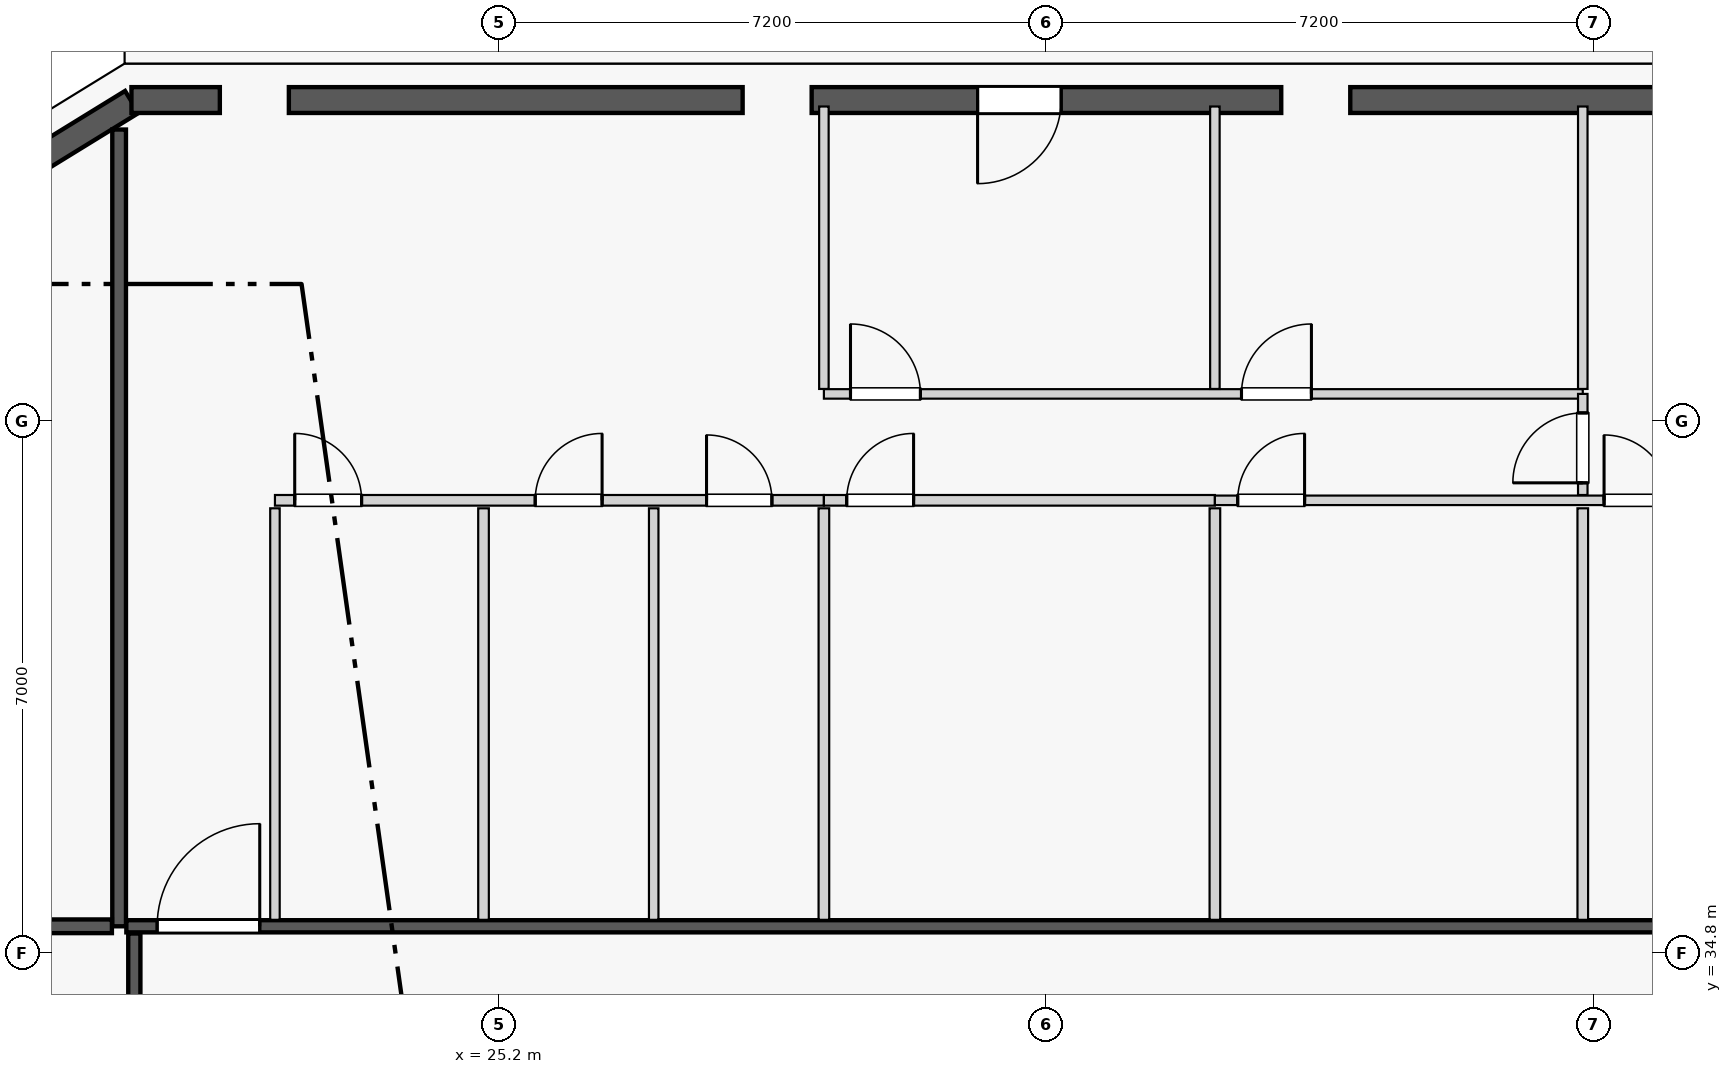
"""IFC4 building model, lengths in metres.
Left out: names, types, materials, properties, quantities, classifications, styles, units other than length and angle.
Written with IfcOpenShell. Run it as: python <this file> out.ifc"""

import sys

from ifc_helpers import new_model, si_unit, direction, frame, frame_2d, origin, origin_2d, place, context, subcontext, project, spatial, rectangle, extrude, element, fill, save


model = new_model("IFC4")
c1 = context("Model", 3, precision=1e-05, world=origin(), true_north=direction((0.0, 1.0)))
c2 = subcontext(c1, "Body", "Model", "MODEL_VIEW")
j1 = project(units=[si_unit("LENGTHUNIT", "METRE"), si_unit("PLANEANGLEUNIT", "RADIAN")], contexts=[c1])
p1 = place(None, origin())
s1 = spatial("IfcSite", under=j1, at=p1, CompositionType="ELEMENT")
p2 = place(p1, origin())
s2 = spatial("IfcBuilding", under=s1, at=p2, CompositionType="ELEMENT")
p3 = place(p2, frame((0.0, 0.0, 186.1)))
s3 = spatial("IfcBuildingStorey", under=s2, at=p3, CompositionType="ELEMENT", Elevation=186.1)
for number, where, z_axis, x_axis in (
    (1, (35.943, 45.958, 0.0), (0.0, 0.0, 1.0), (1.0, 0.0, 0.0)),
    (2, (28.857, 45.958, 0.0), (0.0, 0.0, 1.0), (1.0, 0.0, 0.0)),
    (3, (21.979, 46.011, 0.0), (0.0, 0.0, 1.0), (1.0, 0.0, 0.0)),
):
    element("IfcColumn", number, at=place(p3, frame(where, z_axis=z_axis, x_axis=x_axis)), inside=s3, PredefinedType="COLUMN", context=c2, shape_type="SweptSolid", body=[
        extrude(rectangle(XDim=0.9, YDim=0.9, at=origin_2d()), origin(), (0.0, 0.0, 1.0), 3.55),
    ])
p4 = place(p3, frame((20.142, 44.947, 0.0), z_axis=(0.0, 0.0, 1.0), x_axis=(-0.865230187018, -0.501374833306, 0.0)))
e4 = element("IfcColumn", 4, at=p4, inside=s3, PredefinedType="PILASTER", context=c2, shape_type="SweptSolid", body=[
    extrude(rectangle(XDim=0.5, YDim=0.35, at=origin_2d()), origin(), (0.0, 0.0, 1.0), 3.55),
])
p5 = place(p3, frame((20.367, 45.995, 0.0), z_axis=(0.0, 0.0, 1.0), x_axis=(-0.851713271379, -0.524008113828, 0.0)))
e5 = element("IfcWall", 5, at=p5, inside=s3, PredefinedType="STANDARD", context=c2, shape_type="SweptSolid", body=[
    extrude(rectangle(XDim=1.678, YDim=0.34, at=frame_2d((0.839, 0.0))), origin(), (0.0, 0.0, 1.0), 3.35),
])
p6 = place(p3, frame((42.367, 46.02, 0.0), z_axis=(0.0, 0.0, 1.0), x_axis=(-1.0, 0.0, 0.0)))
e6 = element("IfcWall", 6, at=p6, inside=s3, PredefinedType="STANDARD", context=c2, shape_type="SweptSolid", body=[
    extrude(rectangle(XDim=5.97, YDim=0.34, at=frame_2d((2.985, 0.0))), origin(), (0.0, 0.0, 1.0), 2.883),
])
p7 = place(p6, frame((0.849, 0.0, 0.75)))
e7 = element("IfcOpeningElement", 7, at=p7, cuts=e6, PredefinedType="OPENING", context=c2, shape_type="SweptSolid", body=[
    extrude(rectangle(XDim=1.1, YDim=1.983, at=frame_2d((0.55, 0.991))), frame((0.0, 0.18, 0.0), z_axis=(0.0, -1.0, 0.0), x_axis=(1.0, 0.0, 0.0)), (0.0, 0.0, 1.0), 0.36),
])
p8 = place(p6, frame((3.947, 0.0, 0.75)))
e8 = element("IfcOpeningElement", 8, at=p8, cuts=e6, PredefinedType="OPENING", context=c2, shape_type="SweptSolid", body=[
    extrude(rectangle(XDim=1.1, YDim=1.983, at=frame_2d((0.55, 0.991))), frame((0.0, 0.18, 0.0), z_axis=(0.0, -1.0, 0.0), x_axis=(1.0, 0.0, 0.0)), (0.0, 0.0, 1.0), 0.36),
])
p9 = place(p3, frame((35.489, 46.02, 0.0), z_axis=(0.0, 0.0, 1.0), x_axis=(-1.0, 0.0, 0.0)))
e9 = element("IfcWall", 9, at=p9, inside=s3, PredefinedType="STANDARD", context=c2, shape_type="SweptSolid", body=[
    extrude(rectangle(XDim=6.178, YDim=0.34, at=frame_2d((3.089, 0.0))), origin(), (0.0, 0.0, 1.0), 2.883),
])
p10 = place(p9, frame((2.895, 0.0, 0.0)))
e10 = element("IfcOpeningElement", 10, at=p10, cuts=e9, PredefinedType="OPENING", context=c2, shape_type="SweptSolid", body=[
    extrude(rectangle(XDim=1.1, YDim=2.25, at=frame_2d((0.55, 1.125))), frame((0.0, 0.18, 0.0), z_axis=(0.0, -1.0, 0.0), x_axis=(1.0, 0.0, 0.0)), (0.0, 0.0, 1.0), 0.36),
])
p11 = place(p3, frame((28.403, 46.02, 0.0), z_axis=(0.0, 0.0, 1.0), x_axis=(-1.0, 0.0, 0.0)))
e11 = element("IfcWall", 11, at=p11, inside=s3, PredefinedType="STANDARD", context=c2, shape_type="SweptSolid", body=[
    extrude(rectangle(XDim=5.97, YDim=0.34, at=frame_2d((2.985, 0.0))), origin(), (0.0, 0.0, 1.0), 2.883),
])
p12 = place(p11, frame((2.36, 0.0, 0.75)))
e12 = element("IfcOpeningElement", 12, at=p12, cuts=e11, PredefinedType="OPENING", context=c2, shape_type="SweptSolid", body=[
    extrude(rectangle(XDim=1.25, YDim=1.95, at=frame_2d((0.625, 0.975))), frame((0.0, 0.18, 0.0), z_axis=(0.0, -1.0, 0.0), x_axis=(1.0, 0.0, 0.0)), (0.0, 0.0, 1.0), 0.36),
])
p13 = place(p3, frame((21.525, 46.02, 0.0), z_axis=(0.0, 0.0, 1.0), x_axis=(-1.0, 0.0, 0.0)))
e13 = element("IfcWall", 13, at=p13, inside=s3, PredefinedType="STANDARD", context=c2, shape_type="SweptSolid", body=[
    extrude(rectangle(XDim=1.163, YDim=0.34, at=frame_2d((0.582, 0.0))), origin(), (0.0, 0.0, 1.0), 3.35),
])
p14 = place(p3, frame((20.2, 35.15, 0.0), z_axis=(0.0, 0.0, 1.0), x_axis=(0.0, 1.0, 0.0)))
e14 = element("IfcWall", 14, at=p14, inside=s3, PredefinedType="PARTITIONING", context=c2, shape_type="SweptSolid", body=[
    extrude(rectangle(XDim=10.482, YDim=0.18, at=frame_2d((5.241, 0.0))), origin(), (0.0, 0.0, 1.0), 3.35),
])
p15 = place(p3, frame((20.295, 35.15, 0.0), z_axis=(0.0, 0.0, 1.0), x_axis=(1.0, 0.0, 0.0)))
e15 = element("IfcWall", 15, at=p15, inside=s3, PredefinedType="PARTITIONING", context=c2, shape_type="SweptSolid", body=[
    extrude(rectangle(XDim=24.21, YDim=0.16, at=frame_2d((12.105, 0.0))), origin(), (0.0, 0.0, 1.0), 3.35),
])
p16 = place(p15, frame((0.405, 0.0, 0.0)))
e16 = element("IfcOpeningElement", 16, at=p16, cuts=e15, PredefinedType="OPENING", context=c2, shape_type="SweptSolid", body=[
    extrude(rectangle(XDim=1.35, YDim=2.35, at=frame_2d((0.675, 1.175))), frame((0.0, 0.09, 0.0), z_axis=(0.0, -1.0, 0.0), x_axis=(1.0, 0.0, 0.0)), (0.0, 0.0, 1.0), 0.18),
])
p17 = place(p3, frame((22.25, 35.235, 0.0), z_axis=(0.0, 0.0, 1.0), x_axis=(0.0, 1.0, 0.0)))
e17 = element("IfcWall", 17, at=p17, inside=s3, PredefinedType="PARTITIONING", context=c2, shape_type="SweptSolid", body=[
    extrude(rectangle(XDim=5.414, YDim=0.125, at=frame_2d((2.707, 0.0))), origin(), (0.0, 0.0, 1.0), 2.807),
])
p18 = place(p3, frame((22.25, 40.754, 0.0), z_axis=(0.0, 0.0, 1.0), x_axis=(1.0, 0.0, 0.0)))
e18 = element("IfcWall", 18, at=p18, inside=s3, PredefinedType="PLUMBINGWALL", context=c2, shape_type="SweptSolid", body=[
    extrude(rectangle(XDim=7.222, YDim=0.14, at=frame_2d((3.611, 0.0))), origin(), (0.0, 0.0, 1.0), 3.35),
])
p19 = place(p18, frame((5.678, 0.0, 0.0)))
e19 = element("IfcOpeningElement", 19, at=p19, cuts=e18, PredefinedType="OPENING", context=c2, shape_type="SweptSolid", body=[
    extrude(rectangle(XDim=0.86, YDim=2.1, at=frame_2d((0.43, 1.05))), frame((0.0, 0.08, 0.0), z_axis=(0.0, -1.0, 0.0), x_axis=(1.0, 0.0, 0.0)), (0.0, 0.0, 1.0), 0.16),
])
p20 = place(p18, frame((0.26, 0.0, 0.0)))
e20 = element("IfcOpeningElement", 20, at=p20, cuts=e18, PredefinedType="OPENING", context=c2, shape_type="SweptSolid", body=[
    extrude(rectangle(XDim=0.88, YDim=2.15, at=frame_2d((0.44, 1.075))), frame((0.0, 0.08, 0.0), z_axis=(0.0, -1.0, 0.0), x_axis=(1.0, 0.0, 0.0)), (0.0, 0.0, 1.0), 0.16),
])
p21 = place(p18, frame((3.424, 0.0, 0.0)))
e21 = element("IfcOpeningElement", 21, at=p21, cuts=e18, PredefinedType="OPENING", context=c2, shape_type="SweptSolid", body=[
    extrude(rectangle(XDim=0.88, YDim=2.15, at=frame_2d((0.44, 1.075))), frame((0.0, 0.08, 0.0), z_axis=(0.0, -1.0, 0.0), x_axis=(1.0, 0.0, 0.0)), (0.0, 0.0, 1.0), 0.16),
])
p22 = place(p3, frame((29.472, 40.754, 0.0), z_axis=(0.0, 0.0, 1.0), x_axis=(1.0, 0.0, 0.0)))
e22 = element("IfcWall", 22, at=p22, inside=s3, PredefinedType="PLUMBINGWALL", context=c2, shape_type="SweptSolid", body=[
    extrude(rectangle(XDim=5.144, YDim=0.14, at=frame_2d((2.572, 0.0))), origin(), (0.0, 0.0, 1.0), 3.35),
])
p23 = place(p22, frame((0.3, 0.0, 0.0)))
e23 = element("IfcOpeningElement", 23, at=p23, cuts=e22, PredefinedType="OPENING", context=c2, shape_type="SweptSolid", body=[
    extrude(rectangle(XDim=0.88, YDim=2.15, at=frame_2d((0.44, 1.075))), frame((0.0, 0.08, 0.0), z_axis=(0.0, -1.0, 0.0), x_axis=(1.0, 0.0, 0.0)), (0.0, 0.0, 1.0), 0.16),
])
p24 = place(p3, frame((34.616, 40.754, 0.0), z_axis=(0.0, 0.0, 1.0), x_axis=(1.0, 0.0, 0.0)))
e24 = element("IfcWall", 24, at=p24, inside=s3, PredefinedType="PARTITIONING", context=c2, shape_type="SweptSolid", body=[
    extrude(rectangle(XDim=9.889, YDim=0.125, at=frame_2d((4.944, 0.0))), origin(), (0.0, 0.0, 1.0), 3.35),
])
p25 = place(p24, frame((5.12, 0.0, 0.0)))
e25 = element("IfcOpeningElement", 25, at=p25, cuts=e24, PredefinedType="OPENING", context=c2, shape_type="SweptSolid", body=[
    extrude(rectangle(XDim=0.86, YDim=2.1, at=frame_2d((0.43, 1.05))), frame((0.0, 0.073, 0.0), z_axis=(0.0, -1.0, 0.0), x_axis=(1.0, 0.0, 0.0)), (0.0, 0.0, 1.0), 0.145),
])
p26 = place(p24, frame((7.655, 0.0, 0.0)))
e26 = element("IfcOpeningElement", 26, at=p26, cuts=e24, PredefinedType="OPENING", context=c2, shape_type="SweptSolid", body=[
    extrude(rectangle(XDim=0.88, YDim=2.15, at=frame_2d((0.44, 1.075))), frame((0.0, 0.073, 0.0), z_axis=(0.0, -1.0, 0.0), x_axis=(1.0, 0.0, 0.0)), (0.0, 0.0, 1.0), 0.145),
])
p27 = place(p24, frame((0.3, 0.0, 0.0)))
e27 = element("IfcOpeningElement", 27, at=p27, cuts=e24, PredefinedType="OPENING", context=c2, shape_type="SweptSolid", body=[
    extrude(rectangle(XDim=0.88, YDim=2.15, at=frame_2d((0.44, 1.075))), frame((0.0, 0.073, 0.0), z_axis=(0.0, -1.0, 0.0), x_axis=(1.0, 0.0, 0.0)), (0.0, 0.0, 1.0), 0.145),
])
p28 = place(p3, frame((24.994, 35.235, 0.0), z_axis=(0.0, 0.0, 1.0), x_axis=(0.0, 1.0, 0.0)))
e28 = element("IfcWall", 28, at=p28, inside=s3, PredefinedType="PLUMBINGWALL", context=c2, shape_type="SweptSolid", body=[
    extrude(rectangle(XDim=5.414, YDim=0.14, at=frame_2d((2.707, 0.0))), origin(), (0.0, 0.0, 1.0), 3.35),
])
p29 = place(p3, frame((27.233, 35.235, 0.0), z_axis=(0.0, 0.0, 1.0), x_axis=(0.0, 1.0, 0.0)))
e29 = element("IfcWall", 29, at=p29, inside=s3, PredefinedType="PARTITIONING", context=c2, shape_type="SweptSolid", body=[
    extrude(rectangle(XDim=5.414, YDim=0.125, at=frame_2d((2.707, 0.0))), origin(), (0.0, 0.0, 1.0), 3.35),
])
p30 = place(p3, frame((29.472, 42.219, 0.0), z_axis=(0.0, 0.0, 1.0), x_axis=(0.0, 1.0, 0.0)))
e30 = element("IfcWall", 30, at=p30, inside=s3, PredefinedType="PARTITIONING", context=c2, shape_type="SweptSolid", body=[
    extrude(rectangle(XDim=3.716, YDim=0.125, at=frame_2d((1.858, 0.0))), origin(), (0.0, 0.0, 1.0), 3.35),
])
p31 = place(p3, frame((29.472, 42.154, 0.0), z_axis=(0.0, 0.0, 1.0), x_axis=(1.0, 0.0, 0.0)))
e31 = element("IfcWall", 31, at=p31, inside=s3, PredefinedType="PARTITIONING", context=c2, shape_type="SweptSolid", body=[
    extrude(rectangle(XDim=9.984, YDim=0.125, at=frame_2d((4.992, 0.0))), origin(), (0.0, 0.0, 1.0), 3.35),
])
p32 = place(p31, frame((0.35, 0.0, 0.0)))
e32 = element("IfcOpeningElement", 32, at=p32, cuts=e31, PredefinedType="OPENING", context=c2, shape_type="SweptSolid", body=[
    extrude(rectangle(XDim=0.92, YDim=2.15, at=frame_2d((0.46, 1.075))), frame((0.0, 0.073, 0.0), z_axis=(0.0, -1.0, 0.0), x_axis=(1.0, 0.0, 0.0)), (0.0, 0.0, 1.0), 0.145),
])
p33 = place(p31, frame((5.494, 0.0, 0.0)))
e33 = element("IfcOpeningElement", 33, at=p33, cuts=e31, PredefinedType="OPENING", context=c2, shape_type="SweptSolid", body=[
    extrude(rectangle(XDim=0.92, YDim=2.15, at=frame_2d((0.46, 1.075))), frame((0.0, 0.073, 0.0), z_axis=(0.0, -1.0, 0.0), x_axis=(1.0, 0.0, 0.0)), (0.0, 0.0, 1.0), 0.145),
])
p34 = place(p3, frame((39.456, 40.824, 0.0), z_axis=(0.0, 0.0, 1.0), x_axis=(0.0, 1.0, 0.0)))
e34 = element("IfcWall", 34, at=p34, inside=s3, PredefinedType="PARTITIONING", context=c2, shape_type="SweptSolid", body=[
    extrude(rectangle(XDim=1.33, YDim=0.125, at=frame_2d((0.665, 0.0))), origin(), (0.0, 0.0, 1.0), 3.35),
])
p35 = place(p34, frame((0.16, 0.0, 0.0)))
e35 = element("IfcOpeningElement", 35, at=p35, cuts=e34, PredefinedType="OPENING", context=c2, shape_type="SweptSolid", body=[
    extrude(rectangle(XDim=0.92, YDim=2.15, at=frame_2d((0.46, 1.075))), frame((0.0, 0.073, 0.0), z_axis=(0.0, -1.0, 0.0), x_axis=(1.0, 0.0, 0.0)), (0.0, 0.0, 1.0), 0.145),
])
for number, where, z_axis, x_axis in (
    (36, (29.472, 35.235, 0.0), (0.0, 0.0, 1.0), (0.0, 1.0, 0.0)),
    (37, (34.616, 35.235, 0.0), (0.0, 0.0, 1.0), (0.0, 1.0, 0.0)),
):
    element("IfcWall", number, at=place(p3, frame(where, z_axis=z_axis, x_axis=x_axis)), inside=s3, PredefinedType="PLUMBINGWALL", context=c2, shape_type="SweptSolid", body=[
        extrude(rectangle(XDim=5.414, YDim=0.14, at=frame_2d((2.707, 0.0))), origin(), (0.0, 0.0, 1.0), 3.35),
    ])
for number, where, z_axis, x_axis in (
    (38, (34.616, 42.219, 0.0), (0.0, 0.0, 1.0), (0.0, 1.0, 0.0)),
    (39, (39.456, 42.219, 0.0), (0.0, 0.0, 1.0), (0.0, 1.0, 0.0)),
):
    element("IfcWall", number, at=place(p3, frame(where, z_axis=z_axis, x_axis=x_axis)), inside=s3, PredefinedType="PARTITIONING", context=c2, shape_type="SweptSolid", body=[
        extrude(rectangle(XDim=3.716, YDim=0.125, at=frame_2d((1.858, 0.0))), origin(), (0.0, 0.0, 1.0), 3.35),
    ])
p36 = place(p3, frame((39.456, 35.235, 0.0), z_axis=(0.0, 0.0, 1.0), x_axis=(0.0, 1.0, 0.0)))
e40 = element("IfcWall", 40, at=p36, inside=s3, PredefinedType="PLUMBINGWALL", context=c2, shape_type="SweptSolid", body=[
    extrude(rectangle(XDim=5.414, YDim=0.14, at=frame_2d((2.707, 0.0))), origin(), (0.0, 0.0, 1.0), 3.35),
])
p37 = place(p3, frame((14.11, 35.15, 0.0), z_axis=(0.0, 0.0, 1.0), x_axis=(1.0, 0.0, 0.0)))
e41 = element("IfcWall", 41, at=p37, inside=s3, PredefinedType="PARTITIONING", context=c2, shape_type="SweptSolid", body=[
    extrude(rectangle(XDim=5.995, YDim=0.18, at=frame_2d((2.998, 0.0))), origin(), (0.0, 0.0, 1.0), 3.35),
])
p38 = place(p3, frame((20.4, 25.039, 0.0), z_axis=(0.0, 0.0, 1.0), x_axis=(0.0, 1.0, 0.0)))
e42 = element("IfcWall", 42, at=p38, inside=s3, PredefinedType="PARTITIONING", context=c2, shape_type="SweptSolid", body=[
    extrude(rectangle(XDim=10.016, YDim=0.16, at=frame_2d((5.008, 0.0))), origin(), (0.0, 0.0, 1.0), 3.35),
])
p39 = place(p38, frame((0.45, 0.0, 0.0)))
e43 = element("IfcOpeningElement", 43, at=p39, cuts=e42, PredefinedType="OPENING", context=c2, shape_type="SweptSolid", body=[
    extrude(rectangle(XDim=1.02, YDim=2.25, at=frame_2d((0.51, 1.125))), frame((0.0, 0.09, 0.0), z_axis=(0.0, -1.0, 0.0), x_axis=(1.0, 0.0, 0.0)), (0.0, 0.0, 1.0), 0.18),
])
p40 = place(p10, origin())
e44 = element("IfcDoor", 44, at=p40, inside=s3, OperationType="SINGLE_SWING_RIGHT", PredefinedType="DOOR", context=c2, shape_type="SweptSolid", body=[
    extrude(rectangle(XDim=1.1, YDim=2.25, at=frame_2d((0.55, 1.125))), frame((0.0, 0.025, 0.0), z_axis=(0.0, -1.0, 0.0), x_axis=(1.0, 0.0, 0.0)), (0.0, 0.0, 1.0), 0.05),
])
fill(e10, e44)
p41 = place(p12, origin())
e45 = element("IfcWindow", 45, at=p41, inside=s3, PartitioningType="SINGLE_PANEL", PredefinedType="WINDOW", context=c2, shape_type="SweptSolid", body=[
    extrude(rectangle(XDim=1.25, YDim=1.95, at=frame_2d((0.625, 0.975))), frame((0.0, 0.03, 0.0), z_axis=(0.0, -1.0, 0.0), x_axis=(1.0, 0.0, 0.0)), (0.0, 0.0, 1.0), 0.06),
])
fill(e12, e45)
p42 = place(p19, origin())
e46 = element("IfcDoor", 46, at=p42, inside=s3, OperationType="SINGLE_SWING_LEFT", PredefinedType="DOOR", context=c2, shape_type="SweptSolid", body=[
    extrude(rectangle(XDim=0.86, YDim=2.1, at=frame_2d((0.43, 1.05))), frame((0.0, 0.025, 0.0), z_axis=(0.0, -1.0, 0.0), x_axis=(1.0, 0.0, 0.0)), (0.0, 0.0, 1.0), 0.05),
])
fill(e19, e46)
p43 = place(p25, origin())
e47 = element("IfcDoor", 47, at=p43, inside=s3, OperationType="SINGLE_SWING_LEFT", PredefinedType="DOOR", context=c2, shape_type="SweptSolid", body=[
    extrude(rectangle(XDim=0.86, YDim=2.1, at=frame_2d((0.43, 1.05))), frame((0.0, 0.025, 0.0), z_axis=(0.0, -1.0, 0.0), x_axis=(1.0, 0.0, 0.0)), (0.0, 0.0, 1.0), 0.05),
])
fill(e25, e47)
p44 = place(p16, origin())
e48 = element("IfcDoor", 48, at=p44, inside=s3, OperationType="SINGLE_SWING_RIGHT", PredefinedType="DOOR", context=c2, shape_type="SweptSolid", body=[
    extrude(rectangle(XDim=1.35, YDim=2.35, at=frame_2d((0.675, 1.175))), frame((0.0, 0.025, 0.0), z_axis=(0.0, -1.0, 0.0), x_axis=(1.0, 0.0, 0.0)), (0.0, 0.0, 1.0), 0.05),
])
fill(e16, e48)
p45 = place(p20, origin())
e49 = element("IfcDoor", 49, at=p45, inside=s3, OperationType="SINGLE_SWING_LEFT", PredefinedType="DOOR", context=c2, shape_type="SweptSolid", body=[
    extrude(rectangle(XDim=0.88, YDim=2.15, at=frame_2d((0.44, 1.075))), frame((0.0, 0.025, 0.0), z_axis=(0.0, -1.0, 0.0), x_axis=(1.0, 0.0, 0.0)), (0.0, 0.0, 1.0), 0.05),
])
fill(e20, e49)
p46 = place(p21, origin())
e50 = element("IfcDoor", 50, at=p46, inside=s3, OperationType="SINGLE_SWING_RIGHT", PredefinedType="DOOR", context=c2, shape_type="SweptSolid", body=[
    extrude(rectangle(XDim=0.88, YDim=2.15, at=frame_2d((0.44, 1.075))), frame((0.0, 0.025, 0.0), z_axis=(0.0, -1.0, 0.0), x_axis=(1.0, 0.0, 0.0)), (0.0, 0.0, 1.0), 0.05),
])
fill(e21, e50)
p47 = place(p23, origin())
e51 = element("IfcDoor", 51, at=p47, inside=s3, OperationType="SINGLE_SWING_RIGHT", PredefinedType="DOOR", context=c2, shape_type="SweptSolid", body=[
    extrude(rectangle(XDim=0.88, YDim=2.15, at=frame_2d((0.44, 1.075))), frame((0.0, 0.025, 0.0), z_axis=(0.0, -1.0, 0.0), x_axis=(1.0, 0.0, 0.0)), (0.0, 0.0, 1.0), 0.05),
])
fill(e23, e51)
p48 = place(p32, origin())
e52 = element("IfcDoor", 52, at=p48, inside=s3, OperationType="SINGLE_SWING_LEFT", PredefinedType="DOOR", context=c2, shape_type="SweptSolid", body=[
    extrude(rectangle(XDim=0.92, YDim=2.15, at=frame_2d((0.46, 1.075))), frame((0.0, 0.025, 0.0), z_axis=(0.0, -1.0, 0.0), x_axis=(1.0, 0.0, 0.0)), (0.0, 0.0, 1.0), 0.05),
])
fill(e32, e52)
p49 = place(p33, origin())
e53 = element("IfcDoor", 53, at=p49, inside=s3, OperationType="SINGLE_SWING_RIGHT", PredefinedType="DOOR", context=c2, shape_type="SweptSolid", body=[
    extrude(rectangle(XDim=0.92, YDim=2.15, at=frame_2d((0.46, 1.075))), frame((0.0, 0.025, 0.0), z_axis=(0.0, -1.0, 0.0), x_axis=(1.0, 0.0, 0.0)), (0.0, 0.0, 1.0), 0.05),
])
fill(e33, e53)
p50 = place(p35, origin())
e54 = element("IfcDoor", 54, at=p50, inside=s3, OperationType="SINGLE_SWING_LEFT", PredefinedType="DOOR", context=c2, shape_type="SweptSolid", body=[
    extrude(rectangle(XDim=0.92, YDim=2.15, at=frame_2d((0.46, 1.075))), frame((0.0, 0.025, 0.0), z_axis=(0.0, -1.0, 0.0), x_axis=(1.0, 0.0, 0.0)), (0.0, 0.0, 1.0), 0.05),
])
fill(e35, e54)
p51 = place(p27, origin())
e55 = element("IfcDoor", 55, at=p51, inside=s3, OperationType="SINGLE_SWING_RIGHT", PredefinedType="DOOR", context=c2, shape_type="SweptSolid", body=[
    extrude(rectangle(XDim=0.88, YDim=2.15, at=frame_2d((0.44, 1.075))), frame((0.0, 0.025, 0.0), z_axis=(0.0, -1.0, 0.0), x_axis=(1.0, 0.0, 0.0)), (0.0, 0.0, 1.0), 0.05),
])
fill(e27, e55)
p52 = place(p8, origin())
e56 = element("IfcWindow", 56, at=p52, inside=s3, PartitioningType="SINGLE_PANEL", PredefinedType="WINDOW", context=c2, shape_type="SweptSolid", body=[
    extrude(rectangle(XDim=1.1, YDim=1.983, at=frame_2d((0.55, 0.991))), frame((0.0, 0.03, 0.0), z_axis=(0.0, -1.0, 0.0), x_axis=(1.0, 0.0, 0.0)), (0.0, 0.0, 1.0), 0.06),
])
fill(e8, e56)
save(model, sys.argv[1])
